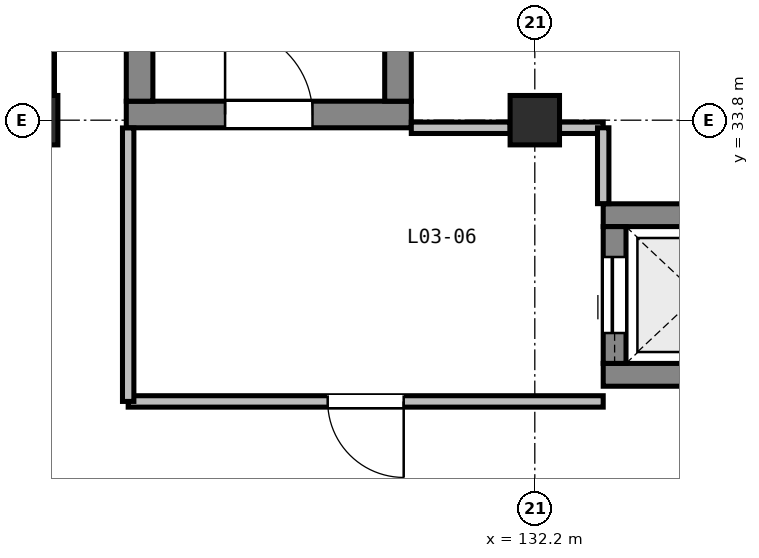
"""IFC4 building model, lengths in metres.
Left out: names, types, materials, properties, quantities, classifications, styles, units other than length and angle.
Written with IfcOpenShell. Run it as: python <this file> out.ifc"""

import sys

from ifc_helpers import new_model, si_unit, direction, frame, frame_2d, origin, origin_2d, place, context, subcontext, project, spatial, rectangle, extrude, element, fill, save


model = new_model("IFC4")
c1 = context("Model", 3, precision=1e-05, world=origin(), true_north=direction((0.0, 1.0)))
c2 = subcontext(c1, "Body", "Model", "MODEL_VIEW")
j1 = project(units=[si_unit("LENGTHUNIT", "METRE"), si_unit("PLANEANGLEUNIT", "RADIAN")], contexts=[c1])
p1 = place(None, origin())
s1 = spatial("IfcSite", under=j1, at=p1, CompositionType="ELEMENT")
p2 = place(p1, origin())
s2 = spatial("IfcBuilding", under=s1, at=p2, CompositionType="ELEMENT")
p3 = place(p2, frame((0.0, 0.0, 15.0)))
s3 = spatial("IfcBuildingStorey", under=s2, at=p3, CompositionType="ELEMENT", Elevation=15.0)
for number, where, z_axis, x_axis in (
    (1, (125.6, 33.8, 0.0), (0.0, 0.0, 1.0), (1.0, 0.0, 0.0)),
    (2, (132.2, 33.8, 0.0), (0.0, 0.0, 1.0), (1.0, 0.0, 0.0)),
):
    element("IfcColumn", number, at=place(p3, frame(where, z_axis=z_axis, x_axis=x_axis)), inside=s3, PredefinedType="COLUMN", context=c2, shape_type="SweptSolid", body=[
        extrude(rectangle(XDim=0.65, YDim=0.65, at=origin_2d()), origin(), (0.0, 0.0, 1.0), 4.5),
    ])
p4 = place(p3, frame((126.825, 33.875, 0.0), z_axis=(0.0, 0.0, 1.0), x_axis=(1.0, 0.0, 0.0)))
e3 = element("IfcWall", 3, at=p4, inside=s3, PredefinedType="SHEAR", context=c2, shape_type="SweptSolid", body=[
    extrude(rectangle(XDim=3.75, YDim=0.35, at=frame_2d((1.875, 0.0))), origin(), (0.0, 0.0, 1.0), 4.5),
])
p5 = place(p4, frame((1.3, 0.0, 0.0)))
e4 = element("IfcOpeningElement", 4, at=p5, cuts=e3, PredefinedType="OPENING", context=c2, shape_type="SweptSolid", body=[
    extrude(rectangle(XDim=1.15, YDim=2.15, at=frame_2d((0.575, 1.075))), frame((0.0, 0.185, 0.0), z_axis=(0.0, -1.0, 0.0), x_axis=(1.0, 0.0, 0.0)), (0.0, 0.0, 1.0), 0.37),
])
for number, where, z_axis, x_axis in (
    (5, (127.0, 34.05, 0.0), (0.0, 0.0, 1.0), (0.0, 1.0, 0.0)),
    (6, (130.4, 34.05, 0.0), (0.0, 0.0, 1.0), (0.0, 1.0, 0.0)),
):
    element("IfcWall", number, at=place(p3, frame(where, z_axis=z_axis, x_axis=x_axis)), inside=s3, PredefinedType="SHEAR", context=c2, shape_type="SweptSolid", body=[
        extrude(rectangle(XDim=7.275, YDim=0.35, at=frame_2d((3.637, 0.0))), origin(), (0.0, 0.0, 1.0), 4.5),
    ])
for number, where, z_axis, x_axis in (
    (7, (133.1, 30.45, 0.0), (0.0, 0.0, 1.0), (1.0, 0.0, 0.0)),
    (8, (133.1, 32.55, 0.0), (0.0, 0.0, 1.0), (1.0, 0.0, 0.0)),
):
    element("IfcWall", number, at=place(p3, frame(where, z_axis=z_axis, x_axis=x_axis)), inside=s3, PredefinedType="SHEAR", context=c2, shape_type="SweptSolid", body=[
        extrude(rectangle(XDim=2.5, YDim=0.3, at=frame_2d((1.25, 0.0))), origin(), (0.0, 0.0, 1.0), 4.5),
    ])
p6 = place(p3, frame((133.25, 30.6, 0.0), z_axis=(0.0, 0.0, 1.0), x_axis=(0.0, 1.0, 0.0)))
e9 = element("IfcWall", 9, at=p6, inside=s3, PredefinedType="SHEAR", context=c2, shape_type="SweptSolid", body=[
    extrude(rectangle(XDim=1.8, YDim=0.3, at=frame_2d((0.9, 0.0))), origin(), (0.0, 0.0, 1.0), 4.5),
])
p7 = place(p6, frame((0.4, 0.0, 0.0)))
e10 = element("IfcOpeningElement", 10, at=p7, cuts=e9, PredefinedType="OPENING", context=c2, shape_type="SweptSolid", body=[
    extrude(rectangle(XDim=1.0, YDim=2.1, at=frame_2d((0.5, 1.05))), frame((0.0, 0.16, 0.0), z_axis=(0.0, -1.0, 0.0), x_axis=(1.0, 0.0, 0.0)), (0.0, 0.0, 1.0), 0.32),
])
p8 = place(p3, frame((125.74, 34.08, 0.0), z_axis=(0.0, 0.0, 1.0), x_axis=(0.0, 1.0, 0.0)))
e11 = element("IfcWall", 11, at=p8, inside=s3, PredefinedType="STANDARD", context=c2, shape_type="SweptSolid", body=[
    extrude(rectangle(XDim=7.84, YDim=0.28, at=frame_2d((3.92, 0.0))), origin(), (0.0, 0.0, 1.0), 3.735),
])
p9 = place(p8, frame((1.067, 0.0, 0.9)))
e12 = element("IfcOpeningElement", 12, at=p9, cuts=e11, PredefinedType="OPENING", context=c2, shape_type="SweptSolid", body=[
    extrude(rectangle(XDim=2.1, YDim=2.1, at=frame_2d((1.05, 1.05))), frame((0.0, 0.15, 0.0), z_axis=(0.0, -1.0, 0.0), x_axis=(1.0, 0.0, 0.0)), (0.0, 0.0, 1.0), 0.3),
])
p10 = place(p8, frame((4.673, 0.0, 0.9)))
e13 = element("IfcOpeningElement", 13, at=p10, cuts=e11, PredefinedType="OPENING", context=c2, shape_type="SweptSolid", body=[
    extrude(rectangle(XDim=2.1, YDim=2.1, at=frame_2d((1.05, 1.05))), frame((0.0, 0.15, 0.0), z_axis=(0.0, -1.0, 0.0), x_axis=(1.0, 0.0, 0.0)), (0.0, 0.0, 1.0), 0.3),
])
p11 = place(p3, frame((130.575, 33.7, 0.0), z_axis=(0.0, 0.0, 1.0), x_axis=(1.0, 0.0, 0.0)))
e14 = element("IfcWall", 14, at=p11, inside=s3, PredefinedType="PARTITIONING", context=c2, shape_type="SweptSolid", body=[
    extrude(rectangle(XDim=1.3, YDim=0.15, at=frame_2d((0.65, 0.0))), origin(), (0.0, 0.0, 1.0), 3.835),
])
p12 = place(p3, frame((132.525, 33.7, 0.0), z_axis=(0.0, 0.0, 1.0), x_axis=(1.0, 0.0, 0.0)))
e15 = element("IfcWall", 15, at=p12, inside=s3, PredefinedType="PARTITIONING", context=c2, shape_type="SweptSolid", body=[
    extrude(rectangle(XDim=0.575, YDim=0.15, at=frame_2d((0.288, 0.0))), origin(), (0.0, 0.0, 1.0), 3.835),
])
p13 = place(p3, frame((133.1, 33.7, 0.0), z_axis=(0.0, 0.0, 1.0), x_axis=(0.0, -1.0, 0.0)))
e16 = element("IfcWall", 16, at=p13, inside=s3, PredefinedType="PARTITIONING", context=c2, shape_type="SweptSolid", body=[
    extrude(rectangle(XDim=0.998, YDim=0.15, at=frame_2d((0.499, 0.0))), origin(), (0.0, 0.0, 1.0), 3.835),
])
p14 = place(p3, frame((133.1, 30.1, 0.0), z_axis=(0.0, 0.0, 1.0), x_axis=(-1.0, 0.0, 0.0)))
e17 = element("IfcWall", 17, at=p14, inside=s3, PredefinedType="PARTITIONING", context=c2, shape_type="SweptSolid", body=[
    extrude(rectangle(XDim=6.25, YDim=0.15, at=frame_2d((3.125, 0.0))), origin(), (0.0, 0.0, 1.0), 3.735),
])
p15 = place(p14, frame((2.625, 0.0, 0.0)))
e18 = element("IfcOpeningElement", 18, at=p15, cuts=e17, PredefinedType="OPENING", context=c2, shape_type="SweptSolid", body=[
    extrude(rectangle(XDim=1.0, YDim=2.1, at=frame_2d((0.5, 1.05))), frame((0.0, 0.085, 0.0), z_axis=(0.0, -1.0, 0.0), x_axis=(1.0, 0.0, 0.0)), (0.0, 0.0, 1.0), 0.17),
])
p16 = place(p3, frame((126.85, 30.1, 0.0), z_axis=(0.0, 0.0, 1.0), x_axis=(0.0, 1.0, 0.0)))
e19 = element("IfcWall", 19, at=p16, inside=s3, PredefinedType="PARTITIONING", context=c2, shape_type="SweptSolid", body=[
    extrude(rectangle(XDim=3.598, YDim=0.15, at=frame_2d((1.799, 0.0))), origin(), (0.0, 0.0, 1.0), 3.835),
])
p17 = place(p5, origin())
e20 = element("IfcDoor", 20, at=p17, inside=s3, OperationType="SINGLE_SWING_LEFT", PredefinedType="DOOR", context=c2, shape_type="SweptSolid", body=[
    extrude(rectangle(XDim=1.15, YDim=2.15, at=frame_2d((0.575, 1.075))), frame((0.0, 0.025, 0.0), z_axis=(0.0, -1.0, 0.0), x_axis=(1.0, 0.0, 0.0)), (0.0, 0.0, 1.0), 0.05),
])
fill(e4, e20)
p18 = place(p7, origin())
e21 = element("IfcDoor", 21, at=p18, inside=s3, OperationType="SLIDING_TO_LEFT", PredefinedType="DOOR", context=c2, shape_type="SweptSolid", body=[
    extrude(rectangle(XDim=1.0, YDim=2.1, at=frame_2d((0.5, 1.05))), frame((0.0, 0.025, 0.0), z_axis=(0.0, -1.0, 0.0), x_axis=(1.0, 0.0, 0.0)), (0.0, 0.0, 1.0), 0.05),
])
fill(e10, e21)
p19 = place(p15, origin())
e22 = element("IfcDoor", 22, at=p19, inside=s3, OperationType="SINGLE_SWING_LEFT", PredefinedType="DOOR", context=c2, shape_type="SweptSolid", body=[
    extrude(rectangle(XDim=1.0, YDim=2.1, at=frame_2d((0.5, 1.05))), frame((0.0, 0.025, 0.0), z_axis=(0.0, -1.0, 0.0), x_axis=(1.0, 0.0, 0.0)), (0.0, 0.0, 1.0), 0.05),
])
fill(e18, e22)
save(model, sys.argv[1])
